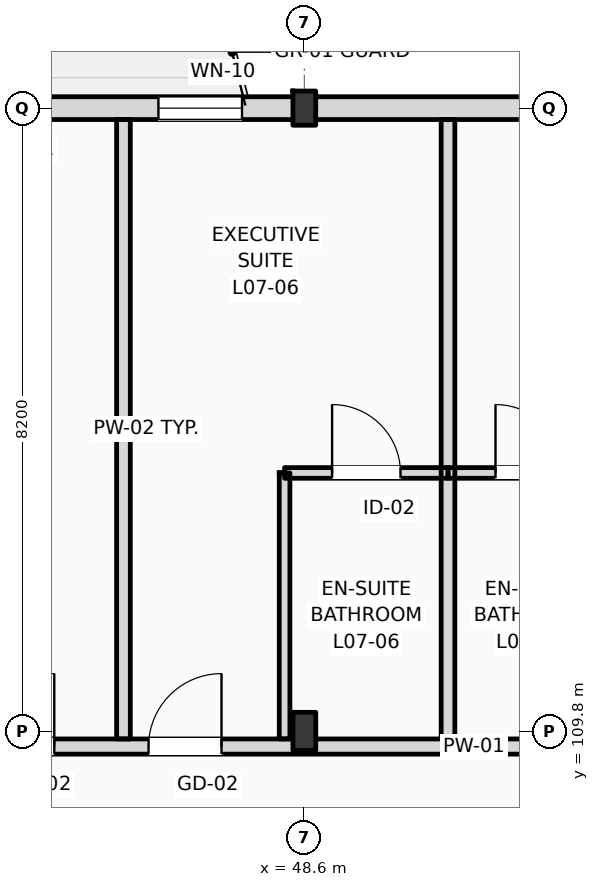
"""IFC4 building model, lengths in metres.
Left out: names, types, materials, properties, quantities, classifications, styles, units other than length and angle.
Written with IfcOpenShell. Run it as: python <this file> out.ifc"""

import sys

from ifc_helpers import new_model, si_unit, direction, frame, frame_2d, origin, origin_2d, place, context, subcontext, project, spatial, rectangle, i_section, extrude, element, fill, save


model = new_model("IFC4")
c1 = context("Model", 3, precision=1e-05, world=origin(), true_north=direction((0.0, 1.0)))
c2 = subcontext(c1, "Body", "Model", "MODEL_VIEW")
j1 = project(units=[si_unit("LENGTHUNIT", "METRE"), si_unit("PLANEANGLEUNIT", "RADIAN")], contexts=[c1])
p1 = place(None, origin())
s1 = spatial("IfcSite", under=j1, at=p1, CompositionType="ELEMENT")
p2 = place(p1, origin())
s2 = spatial("IfcBuilding", under=s1, at=p2, CompositionType="ELEMENT")
p3 = place(p2, frame((0.0, 0.0, 31.8)))
s3 = spatial("IfcBuildingStorey", under=s2, at=p3, CompositionType="ELEMENT", Elevation=31.8)
p4 = place(p3, frame((48.6, 109.8, 0.0), z_axis=(0.0, 0.0, 1.0), x_axis=(1.0, 0.0, 0.0)))
e1 = element("IfcColumn", 1, at=p4, inside=s3, PredefinedType="COLUMN", context=c2, shape_type="SweptSolid", body=[
    extrude(i_section(OverallWidth=0.3, OverallDepth=0.5, WebThickness=0.014, FlangeThickness=0.028, FilletRadius=0.027, at=origin_2d()), origin(), (0.0, 0.0, 1.0), 3.6),
])
p5 = place(p3, frame((48.6, 118.0, 0.0), z_axis=(0.0, 0.0, 1.0), x_axis=(1.0, 0.0, 0.0)))
e2 = element("IfcColumn", 2, at=p5, inside=s3, PredefinedType="COLUMN", context=c2, shape_type="SweptSolid", body=[
    extrude(i_section(OverallWidth=0.3, OverallDepth=0.45, WebThickness=0.014, FlangeThickness=0.026, FilletRadius=0.027, at=origin_2d()), origin(), (0.0, 0.0, 1.0), 3.6),
])
p6 = place(p3, frame((22.5, 118.0, 0.0), z_axis=(0.0, 0.0, 1.0), x_axis=(1.0, 0.0, 0.0)))
e3 = element("IfcWall", 3, at=p6, inside=s3, PredefinedType="STANDARD", context=c2, shape_type="SweptSolid", body=[
    extrude(rectangle(XDim=97.5, YDim=0.3, at=frame_2d((48.75, 0.0))), origin(), (0.0, 0.0, 1.0), 2.72),
])
p7 = place(p6, frame((3.61, 0.0, 0.9)))
e4 = element("IfcOpeningElement", 4, at=p7, cuts=e3, PredefinedType="OPENING", context=c2, shape_type="SweptSolid", body=[
    extrude(rectangle(XDim=1.1, YDim=1.64, at=frame_2d((0.55, 0.82))), frame((0.0, 0.16, 0.0), z_axis=(0.0, -1.0, 0.0), x_axis=(1.0, 0.0, 0.0)), (0.0, 0.0, 1.0), 0.32),
])
p8 = place(p6, frame((6.855, 0.0, 0.0)))
e5 = element("IfcOpeningElement", 5, at=p8, cuts=e3, PredefinedType="OPENING", context=c2, shape_type="SweptSolid", body=[
    extrude(rectangle(XDim=1.2, YDim=2.25, at=frame_2d((0.6, 1.125))), frame((0.0, 0.16, 0.0), z_axis=(0.0, -1.0, 0.0), x_axis=(1.0, 0.0, 0.0)), (0.0, 0.0, 1.0), 0.32),
])
p9 = place(p6, frame((11.405, 0.0, 0.9)))
e6 = element("IfcOpeningElement", 6, at=p9, cuts=e3, PredefinedType="OPENING", context=c2, shape_type="SweptSolid", body=[
    extrude(rectangle(XDim=2.1, YDim=1.64, at=frame_2d((1.05, 0.82))), frame((0.0, 0.16, 0.0), z_axis=(0.0, -1.0, 0.0), x_axis=(1.0, 0.0, 0.0)), (0.0, 0.0, 1.0), 0.32),
])
p10 = place(p6, frame((15.13, 0.0, 0.9)))
e7 = element("IfcOpeningElement", 7, at=p10, cuts=e3, PredefinedType="OPENING", context=c2, shape_type="SweptSolid", body=[
    extrude(rectangle(XDim=2.25, YDim=1.64, at=frame_2d((1.125, 0.82))), frame((0.0, 0.16, 0.0), z_axis=(0.0, -1.0, 0.0), x_axis=(1.0, 0.0, 0.0)), (0.0, 0.0, 1.0), 0.32),
])
p11 = place(p6, frame((21.53, 0.0, 0.0)))
e8 = element("IfcOpeningElement", 8, at=p11, cuts=e3, PredefinedType="OPENING", context=c2, shape_type="SweptSolid", body=[
    extrude(rectangle(XDim=1.2, YDim=2.25, at=frame_2d((0.6, 1.125))), frame((0.0, 0.16, 0.0), z_axis=(0.0, -1.0, 0.0), x_axis=(1.0, 0.0, 0.0)), (0.0, 0.0, 1.0), 0.32),
])
p12 = place(p6, frame((24.18, 0.0, 0.9)))
e9 = element("IfcOpeningElement", 9, at=p12, cuts=e3, PredefinedType="OPENING", context=c2, shape_type="SweptSolid", body=[
    extrude(rectangle(XDim=1.1, YDim=1.64, at=frame_2d((0.55, 0.82))), frame((0.0, 0.16, 0.0), z_axis=(0.0, -1.0, 0.0), x_axis=(1.0, 0.0, 0.0)), (0.0, 0.0, 1.0), 0.32),
])
p13 = place(p6, frame((29.105, 0.0, 0.9)))
e10 = element("IfcOpeningElement", 10, at=p13, cuts=e3, PredefinedType="OPENING", context=c2, shape_type="SweptSolid", body=[
    extrude(rectangle(XDim=2.7, YDim=1.64, at=frame_2d((1.35, 0.82))), frame((0.0, 0.16, 0.0), z_axis=(0.0, -1.0, 0.0), x_axis=(1.0, 0.0, 0.0)), (0.0, 0.0, 1.0), 0.32),
])
p14 = place(p6, frame((34.83, 0.0, 0.9)))
e11 = element("IfcOpeningElement", 11, at=p14, cuts=e3, PredefinedType="OPENING", context=c2, shape_type="SweptSolid", body=[
    extrude(rectangle(XDim=1.8, YDim=1.64, at=frame_2d((0.9, 0.82))), frame((0.0, 0.16, 0.0), z_axis=(0.0, -1.0, 0.0), x_axis=(1.0, 0.0, 0.0)), (0.0, 0.0, 1.0), 0.32),
])
p15 = place(p6, frame((38.525, 0.0, 0.0)))
e12 = element("IfcOpeningElement", 12, at=p15, cuts=e3, PredefinedType="OPENING", context=c2, shape_type="SweptSolid", body=[
    extrude(rectangle(XDim=1.2, YDim=2.25, at=frame_2d((0.6, 1.125))), frame((0.0, 0.16, 0.0), z_axis=(0.0, -1.0, 0.0), x_axis=(1.0, 0.0, 0.0)), (0.0, 0.0, 1.0), 0.32),
])
p16 = place(p6, frame((42.73, 0.0, 0.9)))
e13 = element("IfcOpeningElement", 13, at=p16, cuts=e3, PredefinedType="OPENING", context=c2, shape_type="SweptSolid", body=[
    extrude(rectangle(XDim=3.05, YDim=1.64, at=frame_2d((1.525, 0.82))), frame((0.0, 0.16, 0.0), z_axis=(0.0, -1.0, 0.0), x_axis=(1.0, 0.0, 0.0)), (0.0, 0.0, 1.0), 0.32),
])
p17 = place(p6, frame((47.155, 0.0, 0.9)))
e14 = element("IfcOpeningElement", 14, at=p17, cuts=e3, PredefinedType="OPENING", context=c2, shape_type="SweptSolid", body=[
    extrude(rectangle(XDim=1.35, YDim=1.64, at=frame_2d((0.675, 0.82))), frame((0.0, 0.16, 0.0), z_axis=(0.0, -1.0, 0.0), x_axis=(1.0, 0.0, 0.0)), (0.0, 0.0, 1.0), 0.32),
])
p18 = place(p6, frame((53.065, 0.0, 0.0)))
e15 = element("IfcOpeningElement", 15, at=p18, cuts=e3, PredefinedType="OPENING", context=c2, shape_type="SweptSolid", body=[
    extrude(rectangle(XDim=1.2, YDim=2.25, at=frame_2d((0.6, 1.125))), frame((0.0, 0.16, 0.0), z_axis=(0.0, -1.0, 0.0), x_axis=(1.0, 0.0, 0.0)), (0.0, 0.0, 1.0), 0.32),
])
p19 = place(p6, frame((58.2, 0.0, 0.9)))
e16 = element("IfcOpeningElement", 16, at=p19, cuts=e3, PredefinedType="OPENING", context=c2, shape_type="SweptSolid", body=[
    extrude(rectangle(XDim=1.8, YDim=1.64, at=frame_2d((0.9, 0.82))), frame((0.0, 0.16, 0.0), z_axis=(0.0, -1.0, 0.0), x_axis=(1.0, 0.0, 0.0)), (0.0, 0.0, 1.0), 0.32),
])
p20 = place(p6, frame((61.13, 0.0, 0.9)))
e17 = element("IfcOpeningElement", 17, at=p20, cuts=e3, PredefinedType="OPENING", context=c2, shape_type="SweptSolid", body=[
    extrude(rectangle(XDim=3.05, YDim=1.64, at=frame_2d((1.525, 0.82))), frame((0.0, 0.16, 0.0), z_axis=(0.0, -1.0, 0.0), x_axis=(1.0, 0.0, 0.0)), (0.0, 0.0, 1.0), 0.32),
])
p21 = place(p6, frame((67.93, 0.0, 0.0)))
e18 = element("IfcOpeningElement", 18, at=p21, cuts=e3, PredefinedType="OPENING", context=c2, shape_type="SweptSolid", body=[
    extrude(rectangle(XDim=1.2, YDim=2.25, at=frame_2d((0.6, 1.125))), frame((0.0, 0.16, 0.0), z_axis=(0.0, -1.0, 0.0), x_axis=(1.0, 0.0, 0.0)), (0.0, 0.0, 1.0), 0.32),
])
p22 = place(p6, frame((70.39, 0.0, 0.0)))
e19 = element("IfcOpeningElement", 19, at=p22, cuts=e3, PredefinedType="OPENING", context=c2, shape_type="SweptSolid", body=[
    extrude(rectangle(XDim=1.2, YDim=2.25, at=frame_2d((0.6, 1.125))), frame((0.0, 0.16, 0.0), z_axis=(0.0, -1.0, 0.0), x_axis=(1.0, 0.0, 0.0)), (0.0, 0.0, 1.0), 0.32),
])
p23 = place(p6, frame((75.905, 0.0, 0.9)))
e20 = element("IfcOpeningElement", 20, at=p23, cuts=e3, PredefinedType="OPENING", context=c2, shape_type="SweptSolid", body=[
    extrude(rectangle(XDim=1.1, YDim=1.5, at=frame_2d((0.55, 0.75))), frame((0.0, 0.16, 0.0), z_axis=(0.0, -1.0, 0.0), x_axis=(1.0, 0.0, 0.0)), (0.0, 0.0, 1.0), 0.32),
])
p24 = place(p6, frame((81.63, 0.0, 0.9)))
e21 = element("IfcOpeningElement", 21, at=p24, cuts=e3, PredefinedType="OPENING", context=c2, shape_type="SweptSolid", body=[
    extrude(rectangle(XDim=1.1, YDim=1.6, at=frame_2d((0.55, 0.8))), frame((0.0, 0.16, 0.0), z_axis=(0.0, -1.0, 0.0), x_axis=(1.0, 0.0, 0.0)), (0.0, 0.0, 1.0), 0.32),
])
p25 = place(p6, frame((84.955, 0.0, 0.9)))
e22 = element("IfcOpeningElement", 22, at=p25, cuts=e3, PredefinedType="OPENING", context=c2, shape_type="SweptSolid", body=[
    extrude(rectangle(XDim=1.4, YDim=1.64, at=frame_2d((0.7, 0.82))), frame((0.0, 0.16, 0.0), z_axis=(0.0, -1.0, 0.0), x_axis=(1.0, 0.0, 0.0)), (0.0, 0.0, 1.0), 0.32),
])
p26 = place(p6, frame((90.055, 0.0, 0.9)))
e23 = element("IfcOpeningElement", 23, at=p26, cuts=e3, PredefinedType="OPENING", context=c2, shape_type="SweptSolid", body=[
    extrude(rectangle(XDim=1.6, YDim=1.64, at=frame_2d((0.8, 0.82))), frame((0.0, 0.16, 0.0), z_axis=(0.0, -1.0, 0.0), x_axis=(1.0, 0.0, 0.0)), (0.0, 0.0, 1.0), 0.32),
])
p27 = place(p6, frame((93.87, 0.0, 0.9)))
e24 = element("IfcOpeningElement", 24, at=p27, cuts=e3, PredefinedType="OPENING", context=c2, shape_type="SweptSolid", body=[
    extrude(rectangle(XDim=1.75, YDim=1.64, at=frame_2d((0.875, 0.82))), frame((0.0, 0.16, 0.0), z_axis=(0.0, -1.0, 0.0), x_axis=(1.0, 0.0, 0.0)), (0.0, 0.0, 1.0), 0.32),
])
p28 = place(p3, frame((10.65, 109.6, 0.0), z_axis=(0.0, 0.0, 1.0), x_axis=(1.0, 0.0, 0.0)))
e25 = element("IfcWall", 25, at=p28, inside=s3, PredefinedType="PARTITIONING", context=c2, shape_type="SweptSolid", body=[
    extrude(rectangle(XDim=109.21, YDim=0.2, at=frame_2d((54.605, 0.0))), origin(), (0.0, 0.0, 1.0), 2.72),
])
p29 = place(p28, frame((15.825, 0.0, 0.0)))
e26 = element("IfcOpeningElement", 26, at=p29, cuts=e25, PredefinedType="OPENING", context=c2, shape_type="SweptSolid", body=[
    extrude(rectangle(XDim=1.02, YDim=2.2, at=frame_2d((0.51, 1.1))), frame((0.0, 0.11, 0.0), z_axis=(0.0, -1.0, 0.0), x_axis=(1.0, 0.0, 0.0)), (0.0, 0.0, 1.0), 0.22),
])
p30 = place(p28, frame((19.87, 0.0, 0.0)))
e27 = element("IfcOpeningElement", 27, at=p30, cuts=e25, PredefinedType="OPENING", context=c2, shape_type="SweptSolid", body=[
    extrude(rectangle(XDim=1.02, YDim=2.2, at=frame_2d((0.51, 1.1))), frame((0.0, 0.11, 0.0), z_axis=(0.0, -1.0, 0.0), x_axis=(1.0, 0.0, 0.0)), (0.0, 0.0, 1.0), 0.22),
])
p31 = place(p28, frame((24.47, 0.0, 0.0)))
e28 = element("IfcOpeningElement", 28, at=p31, cuts=e25, PredefinedType="OPENING", context=c2, shape_type="SweptSolid", body=[
    extrude(rectangle(XDim=1.02, YDim=2.2, at=frame_2d((0.51, 1.1))), frame((0.0, 0.11, 0.0), z_axis=(0.0, -1.0, 0.0), x_axis=(1.0, 0.0, 0.0)), (0.0, 0.0, 1.0), 0.22),
])
p32 = place(p28, frame((26.92, 0.0, 0.0)))
e29 = element("IfcOpeningElement", 29, at=p32, cuts=e25, PredefinedType="OPENING", context=c2, shape_type="SweptSolid", body=[
    extrude(rectangle(XDim=1.02, YDim=2.2, at=frame_2d((0.51, 1.1))), frame((0.0, 0.11, 0.0), z_axis=(0.0, -1.0, 0.0), x_axis=(1.0, 0.0, 0.0)), (0.0, 0.0, 1.0), 0.22),
])
p33 = place(p28, frame((33.7, 0.0, 0.0)))
e30 = element("IfcOpeningElement", 30, at=p33, cuts=e25, PredefinedType="OPENING", context=c2, shape_type="SweptSolid", body=[
    extrude(rectangle(XDim=0.96, YDim=2.2, at=frame_2d((0.48, 1.1))), frame((0.0, 0.11, 0.0), z_axis=(0.0, -1.0, 0.0), x_axis=(1.0, 0.0, 0.0)), (0.0, 0.0, 1.0), 0.22),
])
p34 = place(p28, frame((35.9, 0.0, 0.0)))
e31 = element("IfcOpeningElement", 31, at=p34, cuts=e25, PredefinedType="OPENING", context=c2, shape_type="SweptSolid", body=[
    extrude(rectangle(XDim=0.96, YDim=2.2, at=frame_2d((0.48, 1.1))), frame((0.0, 0.11, 0.0), z_axis=(0.0, -1.0, 0.0), x_axis=(1.0, 0.0, 0.0)), (0.0, 0.0, 1.0), 0.22),
])
p35 = place(p28, frame((42.9, 0.0, 0.0)))
e32 = element("IfcOpeningElement", 32, at=p35, cuts=e25, PredefinedType="OPENING", context=c2, shape_type="SweptSolid", body=[
    extrude(rectangle(XDim=0.96, YDim=2.2, at=frame_2d((0.48, 1.1))), frame((0.0, 0.11, 0.0), z_axis=(0.0, -1.0, 0.0), x_axis=(1.0, 0.0, 0.0)), (0.0, 0.0, 1.0), 0.22),
])
p36 = place(p28, frame((47.5, 0.0, 0.0)))
e33 = element("IfcOpeningElement", 33, at=p36, cuts=e25, PredefinedType="OPENING", context=c2, shape_type="SweptSolid", body=[
    extrude(rectangle(XDim=0.96, YDim=2.2, at=frame_2d((0.48, 1.1))), frame((0.0, 0.11, 0.0), z_axis=(0.0, -1.0, 0.0), x_axis=(1.0, 0.0, 0.0)), (0.0, 0.0, 1.0), 0.22),
])
p37 = place(p28, frame((49.95, 0.0, 0.0)))
e34 = element("IfcOpeningElement", 34, at=p37, cuts=e25, PredefinedType="OPENING", context=c2, shape_type="SweptSolid", body=[
    extrude(rectangle(XDim=0.96, YDim=2.2, at=frame_2d((0.48, 1.1))), frame((0.0, 0.11, 0.0), z_axis=(0.0, -1.0, 0.0), x_axis=(1.0, 0.0, 0.0)), (0.0, 0.0, 1.0), 0.22),
])
p38 = place(p28, frame((56.7, 0.0, 0.0)))
e35 = element("IfcOpeningElement", 35, at=p38, cuts=e25, PredefinedType="OPENING", context=c2, shape_type="SweptSolid", body=[
    extrude(rectangle(XDim=0.96, YDim=2.2, at=frame_2d((0.48, 1.1))), frame((0.0, 0.11, 0.0), z_axis=(0.0, -1.0, 0.0), x_axis=(1.0, 0.0, 0.0)), (0.0, 0.0, 1.0), 0.22),
])
p39 = place(p28, frame((59.15, 0.0, 0.0)))
e36 = element("IfcOpeningElement", 36, at=p39, cuts=e25, PredefinedType="OPENING", context=c2, shape_type="SweptSolid", body=[
    extrude(rectangle(XDim=0.96, YDim=2.2, at=frame_2d((0.48, 1.1))), frame((0.0, 0.11, 0.0), z_axis=(0.0, -1.0, 0.0), x_axis=(1.0, 0.0, 0.0)), (0.0, 0.0, 1.0), 0.22),
])
p40 = place(p28, frame((65.9, 0.0, 0.0)))
e37 = element("IfcOpeningElement", 37, at=p40, cuts=e25, PredefinedType="OPENING", context=c2, shape_type="SweptSolid", body=[
    extrude(rectangle(XDim=0.96, YDim=2.2, at=frame_2d((0.48, 1.1))), frame((0.0, 0.11, 0.0), z_axis=(0.0, -1.0, 0.0), x_axis=(1.0, 0.0, 0.0)), (0.0, 0.0, 1.0), 0.22),
])
p41 = place(p28, frame((70.5, 0.0, 0.0)))
e38 = element("IfcOpeningElement", 38, at=p41, cuts=e25, PredefinedType="OPENING", context=c2, shape_type="SweptSolid", body=[
    extrude(rectangle(XDim=0.96, YDim=2.2, at=frame_2d((0.48, 1.1))), frame((0.0, 0.11, 0.0), z_axis=(0.0, -1.0, 0.0), x_axis=(1.0, 0.0, 0.0)), (0.0, 0.0, 1.0), 0.22),
])
p42 = place(p28, frame((72.95, 0.0, 0.0)))
e39 = element("IfcOpeningElement", 39, at=p42, cuts=e25, PredefinedType="OPENING", context=c2, shape_type="SweptSolid", body=[
    extrude(rectangle(XDim=0.96, YDim=2.2, at=frame_2d((0.48, 1.1))), frame((0.0, 0.11, 0.0), z_axis=(0.0, -1.0, 0.0), x_axis=(1.0, 0.0, 0.0)), (0.0, 0.0, 1.0), 0.22),
])
p43 = place(p28, frame((79.7, 0.0, 0.0)))
e40 = element("IfcOpeningElement", 40, at=p43, cuts=e25, PredefinedType="OPENING", context=c2, shape_type="SweptSolid", body=[
    extrude(rectangle(XDim=0.96, YDim=2.2, at=frame_2d((0.48, 1.1))), frame((0.0, 0.11, 0.0), z_axis=(0.0, -1.0, 0.0), x_axis=(1.0, 0.0, 0.0)), (0.0, 0.0, 1.0), 0.22),
])
p44 = place(p28, frame((82.15, 0.0, 0.0)))
e41 = element("IfcOpeningElement", 41, at=p44, cuts=e25, PredefinedType="OPENING", context=c2, shape_type="SweptSolid", body=[
    extrude(rectangle(XDim=0.96, YDim=2.2, at=frame_2d((0.48, 1.1))), frame((0.0, 0.11, 0.0), z_axis=(0.0, -1.0, 0.0), x_axis=(1.0, 0.0, 0.0)), (0.0, 0.0, 1.0), 0.22),
])
p45 = place(p28, frame((88.9, 0.0, 0.0)))
e42 = element("IfcOpeningElement", 42, at=p45, cuts=e25, PredefinedType="OPENING", context=c2, shape_type="SweptSolid", body=[
    extrude(rectangle(XDim=0.96, YDim=2.2, at=frame_2d((0.48, 1.1))), frame((0.0, 0.11, 0.0), z_axis=(0.0, -1.0, 0.0), x_axis=(1.0, 0.0, 0.0)), (0.0, 0.0, 1.0), 0.22),
])
p46 = place(p28, frame((93.75, 0.0, 0.0)))
e43 = element("IfcOpeningElement", 43, at=p46, cuts=e25, PredefinedType="OPENING", context=c2, shape_type="SweptSolid", body=[
    extrude(rectangle(XDim=0.96, YDim=2.2, at=frame_2d((0.48, 1.1))), frame((0.0, 0.11, 0.0), z_axis=(0.0, -1.0, 0.0), x_axis=(1.0, 0.0, 0.0)), (0.0, 0.0, 1.0), 0.22),
])
p47 = place(p28, frame((98.1, 0.0, 0.0)))
e44 = element("IfcOpeningElement", 44, at=p47, cuts=e25, PredefinedType="OPENING", context=c2, shape_type="SweptSolid", body=[
    extrude(rectangle(XDim=0.96, YDim=2.2, at=frame_2d((0.48, 1.1))), frame((0.0, 0.11, 0.0), z_axis=(0.0, -1.0, 0.0), x_axis=(1.0, 0.0, 0.0)), (0.0, 0.0, 1.0), 0.22),
])
p48 = place(p28, frame((102.7, 0.0, 0.0)))
e45 = element("IfcOpeningElement", 45, at=p48, cuts=e25, PredefinedType="OPENING", context=c2, shape_type="SweptSolid", body=[
    extrude(rectangle(XDim=0.96, YDim=2.2, at=frame_2d((0.48, 1.1))), frame((0.0, 0.11, 0.0), z_axis=(0.0, -1.0, 0.0), x_axis=(1.0, 0.0, 0.0)), (0.0, 0.0, 1.0), 0.22),
])
p49 = place(p28, frame((105.04, 0.0, 0.0)))
e46 = element("IfcOpeningElement", 46, at=p49, cuts=e25, PredefinedType="OPENING", context=c2, shape_type="SweptSolid", body=[
    extrude(rectangle(XDim=0.96, YDim=2.2, at=frame_2d((0.48, 1.1))), frame((0.0, 0.11, 0.0), z_axis=(0.0, -1.0, 0.0), x_axis=(1.0, 0.0, 0.0)), (0.0, 0.0, 1.0), 0.22),
])
p50 = place(p28, frame((2.716, 0.0, 0.0)))
e47 = element("IfcOpeningElement", 47, at=p50, cuts=e25, PredefinedType="OPENING", context=c2, shape_type="SweptSolid", body=[
    extrude(rectangle(XDim=1.35, YDim=2.25, at=frame_2d((0.675, 1.125))), frame((0.0, 0.11, 0.0), z_axis=(0.0, -1.0, 0.0), x_axis=(1.0, 0.0, 0.0)), (0.0, 0.0, 1.0), 0.22),
])
p51 = place(p28, frame((6.65, 0.0, 0.0)))
e48 = element("IfcOpeningElement", 48, at=p51, cuts=e25, PredefinedType="OPENING", context=c2, shape_type="SweptSolid", body=[
    extrude(rectangle(XDim=1.35, YDim=2.25, at=frame_2d((0.675, 1.125))), frame((0.0, 0.11, 0.0), z_axis=(0.0, -1.0, 0.0), x_axis=(1.0, 0.0, 0.0)), (0.0, 0.0, 1.0), 0.22),
])
p52 = place(p28, frame((10.583, 0.0, 0.0)))
e49 = element("IfcOpeningElement", 49, at=p52, cuts=e25, PredefinedType="OPENING", context=c2, shape_type="SweptSolid", body=[
    extrude(rectangle(XDim=1.35, YDim=2.25, at=frame_2d((0.675, 1.125))), frame((0.0, 0.11, 0.0), z_axis=(0.0, -1.0, 0.0), x_axis=(1.0, 0.0, 0.0)), (0.0, 0.0, 1.0), 0.22),
])
p53 = place(p3, frame((46.22, 109.7, 0.0), z_axis=(0.0, 0.0, 1.0), x_axis=(0.0, 1.0, 0.0)))
e50 = element("IfcWall", 50, at=p53, inside=s3, PredefinedType="PARTITIONING", context=c2, shape_type="SweptSolid", body=[
    extrude(rectangle(XDim=8.15, YDim=0.18, at=frame_2d((4.075, 0.0))), origin(), (0.0, 0.0, 1.0), 3.05),
])
p54 = place(p3, frame((50.49, 109.7, 0.0), z_axis=(0.0, 0.0, 1.0), x_axis=(0.0, 1.0, 0.0)))
e51 = element("IfcWall", 51, at=p54, inside=s3, PredefinedType="PARTITIONING", context=c2, shape_type="SweptSolid", body=[
    extrude(rectangle(XDim=8.15, YDim=0.18, at=frame_2d((4.075, 0.0))), origin(), (0.0, 0.0, 1.0), 3.36),
])
p55 = place(p3, frame((48.34, 109.7, 0.0), z_axis=(0.0, 0.0, 1.0), x_axis=(0.0, 1.0, 0.0)))
e52 = element("IfcWall", 52, at=p55, inside=s3, PredefinedType="PARTITIONING", context=c2, shape_type="SweptSolid", body=[
    extrude(rectangle(XDim=3.5, YDim=0.14, at=frame_2d((1.75, 0.0))), origin(), (0.0, 0.0, 1.0), 3.36),
])
p56 = place(p3, frame((48.34, 113.2, 0.0), z_axis=(0.0, 0.0, 1.0), x_axis=(1.0, 0.0, 0.0)))
e53 = element("IfcWall", 53, at=p56, inside=s3, PredefinedType="PARTITIONING", context=c2, shape_type="SweptSolid", body=[
    extrude(rectangle(XDim=2.15, YDim=0.14, at=frame_2d((1.075, 0.0))), origin(), (0.0, 0.0, 1.0), 3.36),
])
p57 = place(p56, frame((0.625, 0.0, 0.0)))
e54 = element("IfcOpeningElement", 54, at=p57, cuts=e53, PredefinedType="OPENING", context=c2, shape_type="SweptSolid", body=[
    extrude(rectangle(XDim=0.9, YDim=2.1, at=frame_2d((0.45, 1.05))), frame((0.0, 0.08, 0.0), z_axis=(0.0, -1.0, 0.0), x_axis=(1.0, 0.0, 0.0)), (0.0, 0.0, 1.0), 0.16),
])
p58 = place(p3, frame((50.49, 113.2, 0.0), z_axis=(0.0, 0.0, 1.0), x_axis=(1.0, 0.0, 0.0)))
e55 = element("IfcWall", 55, at=p58, inside=s3, PredefinedType="PARTITIONING", context=c2, shape_type="SweptSolid", body=[
    extrude(rectangle(XDim=2.15, YDim=0.14, at=frame_2d((1.075, 0.0))), origin(), (0.0, 0.0, 1.0), 3.36),
])
p59 = place(p58, frame((0.625, 0.0, 0.0)))
e56 = element("IfcOpeningElement", 56, at=p59, cuts=e55, PredefinedType="OPENING", context=c2, shape_type="SweptSolid", body=[
    extrude(rectangle(XDim=0.9, YDim=2.1, at=frame_2d((0.45, 1.05))), frame((0.0, 0.08, 0.0), z_axis=(0.0, -1.0, 0.0), x_axis=(1.0, 0.0, 0.0)), (0.0, 0.0, 1.0), 0.16),
])
p60 = place(p12, origin())
e57 = element("IfcWindow", 57, at=p60, inside=s3, PartitioningType="DOUBLE_PANEL_VERTICAL", PredefinedType="WINDOW", context=c2, shape_type="SweptSolid", body=[
    extrude(rectangle(XDim=1.1, YDim=1.64, at=frame_2d((0.55, 0.82))), frame((0.0, 0.03, 0.0), z_axis=(0.0, -1.0, 0.0), x_axis=(1.0, 0.0, 0.0)), (0.0, 0.0, 1.0), 0.06),
])
fill(e9, e57)
p61 = place(p33, origin())
e58 = element("IfcDoor", 58, at=p61, inside=s3, OperationType="SINGLE_SWING_RIGHT", PredefinedType="DOOR", context=c2, shape_type="SweptSolid", body=[
    extrude(rectangle(XDim=0.96, YDim=2.2, at=frame_2d((0.48, 1.1))), frame((0.0, 0.025, 0.0), z_axis=(0.0, -1.0, 0.0), x_axis=(1.0, 0.0, 0.0)), (0.0, 0.0, 1.0), 0.05),
])
fill(e30, e58)
p62 = place(p34, origin())
e59 = element("IfcDoor", 59, at=p62, inside=s3, OperationType="SINGLE_SWING_RIGHT", PredefinedType="DOOR", context=c2, shape_type="SweptSolid", body=[
    extrude(rectangle(XDim=0.96, YDim=2.2, at=frame_2d((0.48, 1.1))), frame((0.0, 0.025, 0.0), z_axis=(0.0, -1.0, 0.0), x_axis=(1.0, 0.0, 0.0)), (0.0, 0.0, 1.0), 0.05),
])
fill(e31, e59)
p63 = place(p57, origin())
e60 = element("IfcDoor", 60, at=p63, inside=s3, OperationType="SINGLE_SWING_LEFT", PredefinedType="DOOR", context=c2, shape_type="SweptSolid", body=[
    extrude(rectangle(XDim=0.9, YDim=2.1, at=frame_2d((0.45, 1.05))), frame((0.0, 0.025, 0.0), z_axis=(0.0, -1.0, 0.0), x_axis=(1.0, 0.0, 0.0)), (0.0, 0.0, 1.0), 0.05),
])
fill(e54, e60)
p64 = place(p59, origin())
e61 = element("IfcDoor", 61, at=p64, inside=s3, OperationType="SINGLE_SWING_LEFT", PredefinedType="DOOR", context=c2, shape_type="SweptSolid", body=[
    extrude(rectangle(XDim=0.9, YDim=2.1, at=frame_2d((0.45, 1.05))), frame((0.0, 0.025, 0.0), z_axis=(0.0, -1.0, 0.0), x_axis=(1.0, 0.0, 0.0)), (0.0, 0.0, 1.0), 0.05),
])
fill(e56, e61)
save(model, sys.argv[1])
